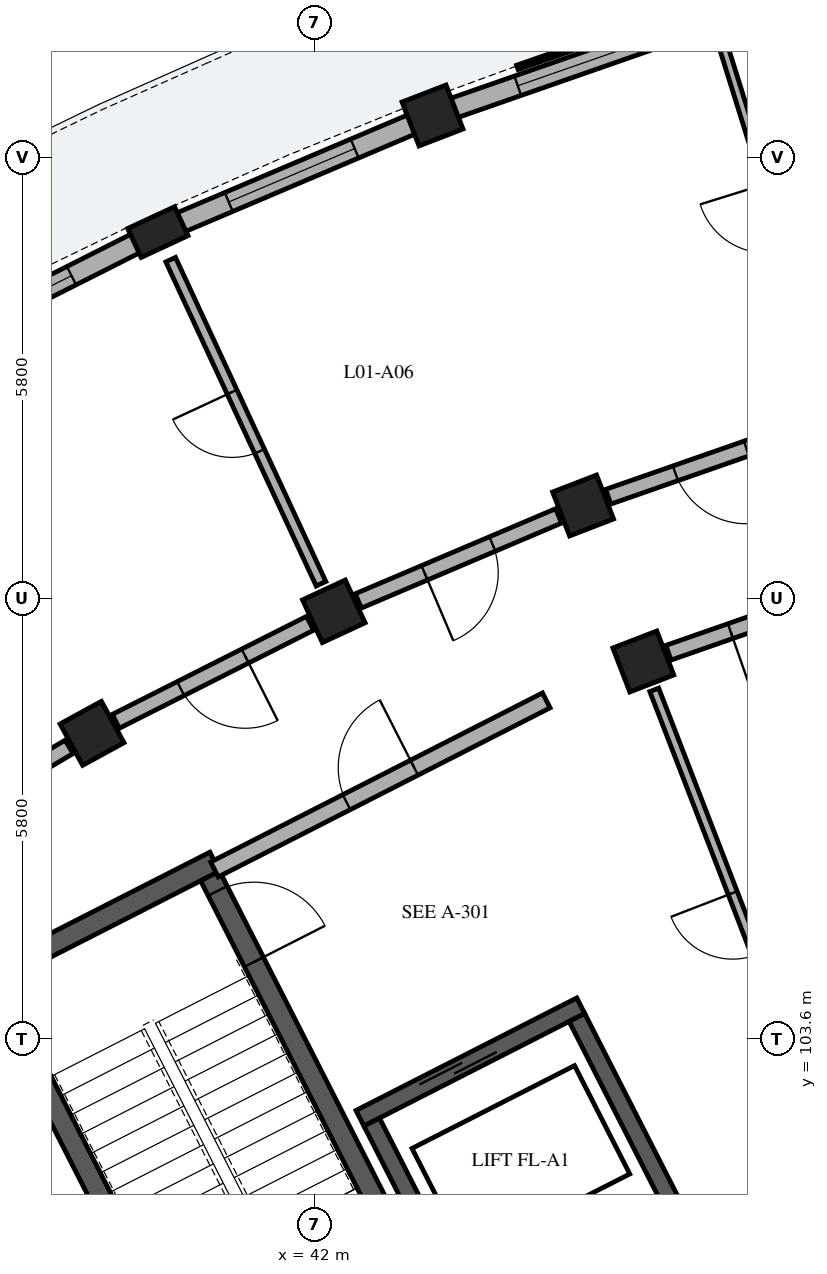
"""IFC4 building model, lengths in metres.
Left out: names, types, materials, properties, quantities, classifications, styles, units other than length and angle.
Written with IfcOpenShell. Run it as: python <this file> out.ifc"""

import sys

from ifc_helpers import new_model, si_unit, direction, frame, frame_2d, origin, origin_2d, place, context, subcontext, project, spatial, rectangle, extrude, element, fill, save


model = new_model("IFC4")
c1 = context("Model", 3, precision=1e-05, world=origin(), true_north=direction((0.0, 1.0)))
c2 = subcontext(c1, "Body", "Model", "MODEL_VIEW")
j1 = project(units=[si_unit("LENGTHUNIT", "METRE"), si_unit("PLANEANGLEUNIT", "RADIAN")], contexts=[c1])
p1 = place(None, origin())
s1 = spatial("IfcSite", under=j1, at=p1, CompositionType="ELEMENT")
p2 = place(p1, origin())
s2 = spatial("IfcBuilding", under=s1, at=p2, CompositionType="ELEMENT")
p3 = place(p2, frame((0.0, 0.0, 4.76)))
s3 = spatial("IfcBuildingStorey", under=s2, at=p3, CompositionType="ELEMENT", Elevation=4.76)
p4 = place(p3, frame((37.773, 104.296, 0.0), z_axis=(0.0, 0.0, 1.0), x_axis=(0.453992276384, -0.891005618941, 0.0)))
e1 = element("IfcWall", 1, at=p4, inside=s3, PredefinedType="SHEAR", context=c2, shape_type="SweptSolid", body=[
    extrude(rectangle(XDim=6.6, YDim=0.28, at=frame_2d((3.3, 0.0))), origin(), (0.0, 0.0, 1.0), 3.83),
])
p5 = place(p3, frame((37.585, 104.357, 0.0), z_axis=(0.0, 0.0, 1.0), x_axis=(0.891020222667, 0.453963613958, 0.0)))
e2 = element("IfcWall", 2, at=p5, inside=s3, PredefinedType="SHEAR", context=c2, shape_type="SweptSolid", body=[
    extrude(rectangle(XDim=3.48, YDim=0.28, at=frame_2d((1.74, 0.0))), origin(), (0.0, 0.0, 1.0), 3.83),
])
p6 = place(p3, frame((40.625, 105.748, 0.0), z_axis=(0.0, 0.0, 1.0), x_axis=(0.453992276384, -0.891005618941, 0.0)))
e3 = element("IfcWall", 3, at=p6, inside=s3, PredefinedType="SHEAR", context=c2, shape_type="SweptSolid", body=[
    extrude(rectangle(XDim=6.6, YDim=0.28, at=frame_2d((3.3, 0.0))), origin(), (0.0, 0.0, 1.0), 3.83),
])
p7 = place(p6, frame((0.22, 0.0, 0.0)))
e4 = element("IfcOpeningElement", 4, at=p7, cuts=e3, PredefinedType="OPENING", context=c2, shape_type="SweptSolid", body=[
    extrude(rectangle(XDim=1.05, YDim=2.15, at=frame_2d((0.525, 1.075))), frame((0.0, 0.15, 0.0), z_axis=(0.0, -1.0, 0.0), x_axis=(1.0, 0.0, 0.0)), (0.0, 0.0, 1.0), 0.3),
])
p8 = place(p3, frame((42.597, 102.561, 0.0), z_axis=(0.0, 0.0, 1.0), x_axis=(0.891001200497, 0.454000947921, 0.0)))
e5 = element("IfcWall", 5, at=p8, inside=s3, PredefinedType="SHEAR", context=c2, shape_type="SweptSolid", body=[
    extrude(rectangle(XDim=3.26, YDim=0.23, at=frame_2d((1.63, 0.0))), origin(), (0.0, 0.0, 1.0), 3.83),
])
p9 = place(p8, frame((0.9, 0.0, 0.0)))
e6 = element("IfcOpeningElement", 6, at=p9, cuts=e5, PredefinedType="OPENING", context=c2, shape_type="SweptSolid", body=[
    extrude(rectangle(XDim=1.1, YDim=2.15, at=frame_2d((0.55, 1.075))), frame((0.0, 0.125, 0.0), z_axis=(0.0, -1.0, 0.0), x_axis=(1.0, 0.0, 0.0)), (0.0, 0.0, 1.0), 0.25),
])
for number, where, z_axis, x_axis in (
    (7, (42.751, 102.511, 0.0), (0.0, 0.0, 1.0), (0.454, -0.891, 0.0)),
    (8, (45.451, 103.886, 0.0), (0.0, 0.0, 1.0), (0.454, -0.891, 0.0)),
):
    element("IfcWall", number, at=place(p3, frame(where, z_axis=z_axis, x_axis=x_axis)), inside=s3, PredefinedType="SHEAR", context=c2, shape_type="SweptSolid", body=[
        extrude(rectangle(XDim=2.7, YDim=0.23, at=frame_2d((1.35, 0.0))), origin(), (0.0, 0.0, 1.0), 3.83),
    ])
for number, where, z_axis, x_axis in (
    (9, (46.325, 108.57, 0.0), (0.0, 0.0, 1.0), (-0.36, 0.933, 0.0)),
    (10, (45.532, 110.622, 0.0), (0.0, 0.0, 1.0), (-0.36, 0.933, 0.0)),
    (11, (43.552, 115.753, 0.0), (0.0, 0.0, 1.0), (-0.36, 0.933, 0.0)),
    (12, (42.252, 109.23, 0.0), (0.0, 0.0, 1.0), (-0.421, 0.907, 0.0)),
):
    element("IfcColumn", number, at=place(p3, frame(where, z_axis=z_axis, x_axis=x_axis)), inside=s3, PredefinedType="COLUMN", context=c2, shape_type="SweptSolid", body=[
        extrude(rectangle(XDim=0.62, YDim=0.62, at=origin_2d()), origin(), (0.0, 0.0, 1.0), 3.825),
    ])
p10 = place(p3, frame((39.938, 114.219, 0.0), z_axis=(0.0, 0.0, 1.0), x_axis=(-0.420859924104, 0.907125638643, 0.0)))
e13 = element("IfcColumn", 13, at=p10, inside=s3, PredefinedType="PILASTER", context=c2, shape_type="SweptSolid", body=[
    extrude(rectangle(XDim=0.42, YDim=0.68, at=origin_2d()), origin(), (0.0, 0.0, 1.0), 3.825),
])
p11 = place(p3, frame((39.072, 107.625, 0.0), z_axis=(0.0, 0.0, 1.0), x_axis=(-0.479713133669, 0.877425386791, 0.0)))
e14 = element("IfcColumn", 14, at=p11, inside=s3, PredefinedType="COLUMN", context=c2, shape_type="SweptSolid", body=[
    extrude(rectangle(XDim=0.62, YDim=0.62, at=origin_2d()), origin(), (0.0, 0.0, 1.0), 3.825),
])
p12 = place(p3, frame((47.088, 116.986, 0.0), z_axis=(0.0, 0.0, 1.0), x_axis=(-0.944261813885, -0.329195423477, 0.0)))
e15 = element("IfcWall", 15, at=p12, inside=s3, PredefinedType="SOLIDWALL", context=c2, shape_type="SweptSolid", body=[
    extrude(rectangle(XDim=3.466, YDim=0.27, at=frame_2d((1.733, 0.0))), origin(), (0.0, 0.0, 1.0), 3.075),
])
p13 = place(p12, frame((0.908, 0.0, 0.55)))
e16 = element("IfcOpeningElement", 16, at=p13, cuts=e15, PredefinedType="OPENING", context=c2, shape_type="SweptSolid", body=[
    extrude(rectangle(XDim=1.65, YDim=1.8, at=frame_2d((0.825, 0.9))), frame((0.0, 0.145, 0.0), z_axis=(0.0, -1.0, 0.0), x_axis=(1.0, 0.0, 0.0)), (0.0, 0.0, 1.0), 0.29),
])
p14 = place(p3, frame((43.294, 115.644, 0.0), z_axis=(0.0, 0.0, 1.0), x_axis=(-0.920495033259, -0.390754262607, 0.0)))
e17 = element("IfcWall", 17, at=p14, inside=s3, PredefinedType="SOLIDWALL", context=c2, shape_type="SweptSolid", body=[
    extrude(rectangle(XDim=3.466, YDim=0.27, at=frame_2d((1.733, 0.0))), origin(), (0.0, 0.0, 1.0), 3.075),
])
p15 = place(p14, frame((0.833, 0.0, 0.55)))
e18 = element("IfcOpeningElement", 18, at=p15, cuts=e17, PredefinedType="OPENING", context=c2, shape_type="SweptSolid", body=[
    extrude(rectangle(XDim=1.8, YDim=1.85, at=frame_2d((0.9, 0.925))), frame((0.0, 0.145, 0.0), z_axis=(0.0, -1.0, 0.0), x_axis=(1.0, 0.0, 0.0)), (0.0, 0.0, 1.0), 0.29),
])
p16 = place(p3, frame((39.777, 114.138, 0.0), z_axis=(0.0, 0.0, 1.0), x_axis=(-0.892772658884, -0.450507468915, 0.0)))
e19 = element("IfcWall", 19, at=p16, inside=s3, PredefinedType="SOLIDWALL", context=c2, shape_type="SweptSolid", body=[
    extrude(rectangle(XDim=3.466, YDim=0.27, at=frame_2d((1.733, 0.0))), origin(), (0.0, 0.0, 1.0), 3.075),
])
p17 = place(p16, frame((1.093, 0.0, 0.55)))
e20 = element("IfcOpeningElement", 20, at=p17, cuts=e19, PredefinedType="OPENING", context=c2, shape_type="SweptSolid", body=[
    extrude(rectangle(XDim=1.28, YDim=1.52, at=frame_2d((0.64, 0.76))), frame((0.0, 0.145, 0.0), z_axis=(0.0, -1.0, 0.0), x_axis=(1.0, 0.0, 0.0)), (0.0, 0.0, 1.0), 0.29),
])
p18 = place(p3, frame((40.682, 105.834, 0.0), z_axis=(0.0, 0.0, 1.0), x_axis=(0.891003372311, 0.453996685595, 0.0)))
e21 = element("IfcWall", 21, at=p18, inside=s3, PredefinedType="PARTITIONING", context=c2, shape_type="SweptSolid", body=[
    extrude(rectangle(XDim=4.9, YDim=0.22, at=frame_2d((2.45, 0.0))), origin(), (0.0, 0.0, 1.0), 3.06),
])
p19 = place(p18, frame((1.95, 0.0, 0.0)))
e22 = element("IfcOpeningElement", 22, at=p19, cuts=e21, PredefinedType="OPENING", context=c2, shape_type="SweptSolid", body=[
    extrude(rectangle(XDim=1.0, YDim=2.15, at=frame_2d((0.5, 1.075))), frame((0.0, 0.12, 0.0), z_axis=(0.0, -1.0, 0.0), x_axis=(1.0, 0.0, 0.0)), (0.0, 0.0, 1.0), 0.24),
])
p20 = place(p3, frame((48.778, 112.177, 0.0), z_axis=(0.0, 0.0, 1.0), x_axis=(-0.297905254614, 0.954595442726, 0.0)))
e23 = element("IfcWall", 23, at=p20, inside=s3, PredefinedType="PARTITIONING", context=c2, shape_type="SweptSolid", body=[
    extrude(rectangle(XDim=4.7, YDim=0.115, at=frame_2d((2.35, 0.0))), origin(), (0.0, 0.0, 1.0), 3.09),
])
p21 = place(p20, frame((1.895, 0.0, 0.0)))
e24 = element("IfcOpeningElement", 24, at=p21, cuts=e23, PredefinedType="OPENING", context=c2, shape_type="SweptSolid", body=[
    extrude(rectangle(XDim=0.91, YDim=2.1, at=frame_2d((0.455, 1.05))), frame((0.0, 0.067, 0.0), z_axis=(0.0, -1.0, 0.0), x_axis=(1.0, 0.0, 0.0)), (0.0, 0.0, 1.0), 0.135),
])
p22 = place(p3, frame((48.566, 111.68, 0.0), z_axis=(0.0, 0.0, 1.0), x_axis=(-0.944253820929, -0.329218349522, 0.0)))
e25 = element("IfcWall", 25, at=p22, inside=s3, PredefinedType="PARTITIONING", context=c2, shape_type="SweptSolid", body=[
    extrude(rectangle(XDim=2.863, YDim=0.205, at=frame_2d((1.432, 0.0))), origin(), (0.0, 0.0, 1.0), 3.09),
])
p23 = place(p22, frame((0.937, 0.0, 0.0)))
e26 = element("IfcOpeningElement", 26, at=p23, cuts=e25, PredefinedType="OPENING", context=c2, shape_type="SweptSolid", body=[
    extrude(rectangle(XDim=0.99, YDim=2.16, at=frame_2d((0.495, 1.08))), frame((0.0, 0.113, 0.0), z_axis=(0.0, -1.0, 0.0), x_axis=(1.0, 0.0, 0.0)), (0.0, 0.0, 1.0), 0.225),
])
p24 = place(p3, frame((49.222, 109.58, 0.0), z_axis=(0.0, 0.0, 1.0), x_axis=(-0.944265123647, -0.329185929627, 0.0)))
e27 = element("IfcWall", 27, at=p24, inside=s3, PredefinedType="PARTITIONING", context=c2, shape_type="SweptSolid", body=[
    extrude(rectangle(XDim=2.718, YDim=0.205, at=frame_2d((1.359, 0.0))), origin(), (0.0, 0.0, 1.0), 3.09),
])
p25 = place(p24, frame((0.864, 0.0, 0.0)))
e28 = element("IfcOpeningElement", 28, at=p25, cuts=e27, PredefinedType="OPENING", context=c2, shape_type="SweptSolid", body=[
    extrude(rectangle(XDim=0.99, YDim=2.16, at=frame_2d((0.495, 1.08))), frame((0.0, 0.113, 0.0), z_axis=(0.0, -1.0, 0.0), x_axis=(1.0, 0.0, 0.0)), (0.0, 0.0, 1.0), 0.225),
])
p26 = place(p3, frame((48.846, 102.04, 0.0), z_axis=(0.0, 0.0, 1.0), x_axis=(-0.360183473608, 0.932881485152, 0.0)))
e29 = element("IfcWall", 29, at=p26, inside=s3, PredefinedType="PARTITIONING", context=c2, shape_type="SweptSolid", body=[
    extrude(rectangle(XDim=6.6, YDim=0.125, at=frame_2d((3.3, 0.0))), origin(), (0.0, 0.0, 1.0), 3.09),
])
p27 = place(p26, frame((2.865, 0.0, 0.0)))
e30 = element("IfcOpeningElement", 30, at=p27, cuts=e29, PredefinedType="OPENING", context=c2, shape_type="SweptSolid", body=[
    extrude(rectangle(XDim=0.87, YDim=2.08, at=frame_2d((0.435, 1.04))), frame((0.0, 0.073, 0.0), z_axis=(0.0, -1.0, 0.0), x_axis=(1.0, 0.0, 0.0)), (0.0, 0.0, 1.0), 0.145),
])
p28 = place(p3, frame((45.21, 110.486, 0.0), z_axis=(0.0, 0.0, 1.0), x_axis=(-0.920511160294, -0.390716270168, 0.0)))
e31 = element("IfcWall", 31, at=p28, inside=s3, PredefinedType="PARTITIONING", context=c2, shape_type="SweptSolid", body=[
    extrude(rectangle(XDim=2.863, YDim=0.205, at=frame_2d((1.432, 0.0))), origin(), (0.0, 0.0, 1.0), 3.09),
])
p29 = place(p28, frame((0.947, 0.0, 0.0)))
e32 = element("IfcOpeningElement", 32, at=p29, cuts=e31, PredefinedType="OPENING", context=c2, shape_type="SweptSolid", body=[
    extrude(rectangle(XDim=0.97, YDim=2.15, at=frame_2d((0.485, 1.075))), frame((0.0, 0.113, 0.0), z_axis=(0.0, -1.0, 0.0), x_axis=(1.0, 0.0, 0.0)), (0.0, 0.0, 1.0), 0.225),
])
p30 = place(p3, frame((42.084, 109.593, 0.0), z_axis=(0.0, 0.0, 1.0), x_axis=(-0.420862519045, 0.907124434718, 0.0)))
e33 = element("IfcWall", 33, at=p30, inside=s3, PredefinedType="PLUMBINGWALL", context=c2, shape_type="SweptSolid", body=[
    extrude(rectangle(XDim=4.7, YDim=0.14, at=frame_2d((2.35, 0.0))), origin(), (0.0, 0.0, 1.0), 3.09),
])
p31 = place(p30, frame((1.92, 0.0, 0.0)))
e34 = element("IfcOpeningElement", 34, at=p31, cuts=e33, PredefinedType="OPENING", context=c2, shape_type="SweptSolid", body=[
    extrude(rectangle(XDim=0.86, YDim=2.06, at=frame_2d((0.43, 1.03))), frame((0.0, 0.08, 0.0), z_axis=(0.0, -1.0, 0.0), x_axis=(1.0, 0.0, 0.0)), (0.0, 0.0, 1.0), 0.16),
])
p32 = place(p3, frame((41.94, 109.073, 0.0), z_axis=(0.0, 0.0, 1.0), x_axis=(-0.89273239336, -0.450587254419, 0.0)))
e35 = element("IfcWall", 35, at=p32, inside=s3, PredefinedType="PARTITIONING", context=c2, shape_type="SweptSolid", body=[
    extrude(rectangle(XDim=2.863, YDim=0.205, at=frame_2d((1.432, 0.0))), origin(), (0.0, 0.0, 1.0), 3.09),
])
p33 = place(p32, frame((0.957, 0.0, 0.0)))
e36 = element("IfcOpeningElement", 36, at=p33, cuts=e35, PredefinedType="OPENING", context=c2, shape_type="SweptSolid", body=[
    extrude(rectangle(XDim=0.95, YDim=2.13, at=frame_2d((0.475, 1.065))), frame((0.0, 0.113, 0.0), z_axis=(0.0, -1.0, 0.0), x_axis=(1.0, 0.0, 0.0)), (0.0, 0.0, 1.0), 0.225),
])
p34 = place(p3, frame((38.77, 107.447, 0.0), z_axis=(0.0, 0.0, 1.0), x_axis=(-0.861113214678, -0.508413248753, 0.0)))
e37 = element("IfcWall", 37, at=p34, inside=s3, PredefinedType="PARTITIONING", context=c2, shape_type="SweptSolid", body=[
    extrude(rectangle(XDim=2.863, YDim=0.205, at=frame_2d((1.432, 0.0))), origin(), (0.0, 0.0, 1.0), 3.09),
])
p35 = place(p34, frame((0.967, 0.0, 0.0)))
e38 = element("IfcOpeningElement", 38, at=p35, cuts=e37, PredefinedType="OPENING", context=c2, shape_type="SweptSolid", body=[
    extrude(rectangle(XDim=0.93, YDim=2.12, at=frame_2d((0.465, 1.06))), frame((0.0, 0.113, 0.0), z_axis=(0.0, -1.0, 0.0), x_axis=(1.0, 0.0, 0.0)), (0.0, 0.0, 1.0), 0.225),
])
p36 = place(p13, origin())
e39 = element("IfcWindow", 39, at=p36, inside=s3, PartitioningType="SINGLE_PANEL", PredefinedType="WINDOW", context=c2, shape_type="SweptSolid", body=[
    extrude(rectangle(XDim=1.65, YDim=1.8, at=frame_2d((0.825, 0.9))), frame((0.0, 0.03, 0.0), z_axis=(0.0, -1.0, 0.0), x_axis=(1.0, 0.0, 0.0)), (0.0, 0.0, 1.0), 0.06),
])
fill(e16, e39)
p37 = place(p15, origin())
e40 = element("IfcWindow", 40, at=p37, inside=s3, PartitioningType="SINGLE_PANEL", PredefinedType="WINDOW", context=c2, shape_type="SweptSolid", body=[
    extrude(rectangle(XDim=1.8, YDim=1.85, at=frame_2d((0.9, 0.925))), frame((0.0, 0.03, 0.0), z_axis=(0.0, -1.0, 0.0), x_axis=(1.0, 0.0, 0.0)), (0.0, 0.0, 1.0), 0.06),
])
fill(e18, e40)
p38 = place(p17, origin())
e41 = element("IfcWindow", 41, at=p38, inside=s3, PartitioningType="SINGLE_PANEL", PredefinedType="WINDOW", context=c2, shape_type="SweptSolid", body=[
    extrude(rectangle(XDim=1.28, YDim=1.52, at=frame_2d((0.64, 0.76))), frame((0.0, 0.03, 0.0), z_axis=(0.0, -1.0, 0.0), x_axis=(1.0, 0.0, 0.0)), (0.0, 0.0, 1.0), 0.06),
])
fill(e20, e41)
p39 = place(p7, origin())
e42 = element("IfcDoor", 42, at=p39, inside=s3, OperationType="SINGLE_SWING_RIGHT", PredefinedType="DOOR", context=c2, shape_type="SweptSolid", body=[
    extrude(rectangle(XDim=1.05, YDim=2.15, at=frame_2d((0.525, 1.075))), frame((0.0, 0.025, 0.0), z_axis=(0.0, -1.0, 0.0), x_axis=(1.0, 0.0, 0.0)), (0.0, 0.0, 1.0), 0.05),
])
fill(e4, e42)
p40 = place(p9, origin())
e43 = element("IfcDoor", 43, at=p40, inside=s3, OperationType="DOUBLE_DOOR_SLIDING", PredefinedType="DOOR", context=c2, shape_type="SweptSolid", body=[
    extrude(rectangle(XDim=1.1, YDim=2.15, at=frame_2d((0.55, 1.075))), frame((0.0, 0.025, 0.0), z_axis=(0.0, -1.0, 0.0), x_axis=(1.0, 0.0, 0.0)), (0.0, 0.0, 1.0), 0.05),
])
fill(e6, e43)
p41 = place(p19, origin())
e44 = element("IfcDoor", 44, at=p41, inside=s3, OperationType="SINGLE_SWING_RIGHT", PredefinedType="DOOR", context=c2, shape_type="SweptSolid", body=[
    extrude(rectangle(XDim=1.0, YDim=2.15, at=frame_2d((0.5, 1.075))), frame((0.0, 0.025, 0.0), z_axis=(0.0, -1.0, 0.0), x_axis=(1.0, 0.0, 0.0)), (0.0, 0.0, 1.0), 0.05),
])
fill(e22, e44)
p42 = place(p23, origin())
e45 = element("IfcDoor", 45, at=p42, inside=s3, OperationType="SINGLE_SWING_LEFT", PredefinedType="DOOR", context=c2, shape_type="SweptSolid", body=[
    extrude(rectangle(XDim=0.99, YDim=2.16, at=frame_2d((0.495, 1.08))), frame((0.0, 0.025, 0.0), z_axis=(0.0, -1.0, 0.0), x_axis=(1.0, 0.0, 0.0)), (0.0, 0.0, 1.0), 0.05),
])
fill(e26, e45)
p43 = place(p25, origin())
e46 = element("IfcDoor", 46, at=p43, inside=s3, OperationType="SINGLE_SWING_RIGHT", PredefinedType="DOOR", context=c2, shape_type="SweptSolid", body=[
    extrude(rectangle(XDim=0.99, YDim=2.16, at=frame_2d((0.495, 1.08))), frame((0.0, 0.025, 0.0), z_axis=(0.0, -1.0, 0.0), x_axis=(1.0, 0.0, 0.0)), (0.0, 0.0, 1.0), 0.05),
])
fill(e28, e46)
p44 = place(p27, origin())
e47 = element("IfcDoor", 47, at=p44, inside=s3, OperationType="SINGLE_SWING_RIGHT", PredefinedType="DOOR", context=c2, shape_type="SweptSolid", body=[
    extrude(rectangle(XDim=0.87, YDim=2.08, at=frame_2d((0.435, 1.04))), frame((0.0, 0.025, 0.0), z_axis=(0.0, -1.0, 0.0), x_axis=(1.0, 0.0, 0.0)), (0.0, 0.0, 1.0), 0.05),
])
fill(e30, e47)
p45 = place(p29, origin())
e48 = element("IfcDoor", 48, at=p45, inside=s3, OperationType="SINGLE_SWING_RIGHT", PredefinedType="DOOR", context=c2, shape_type="SweptSolid", body=[
    extrude(rectangle(XDim=0.97, YDim=2.15, at=frame_2d((0.485, 1.075))), frame((0.0, 0.025, 0.0), z_axis=(0.0, -1.0, 0.0), x_axis=(1.0, 0.0, 0.0)), (0.0, 0.0, 1.0), 0.05),
])
fill(e32, e48)
p46 = place(p31, origin())
e49 = element("IfcDoor", 49, at=p46, inside=s3, OperationType="SINGLE_SWING_RIGHT", PredefinedType="DOOR", context=c2, shape_type="SweptSolid", body=[
    extrude(rectangle(XDim=0.86, YDim=2.06, at=frame_2d((0.43, 1.03))), frame((0.0, 0.025, 0.0), z_axis=(0.0, -1.0, 0.0), x_axis=(1.0, 0.0, 0.0)), (0.0, 0.0, 1.0), 0.05),
])
fill(e34, e49)
p47 = place(p33, origin())
e50 = element("IfcDoor", 50, at=p47, inside=s3, OperationType="SINGLE_SWING_LEFT", PredefinedType="DOOR", context=c2, shape_type="SweptSolid", body=[
    extrude(rectangle(XDim=0.95, YDim=2.13, at=frame_2d((0.475, 1.065))), frame((0.0, 0.025, 0.0), z_axis=(0.0, -1.0, 0.0), x_axis=(1.0, 0.0, 0.0)), (0.0, 0.0, 1.0), 0.05),
])
fill(e36, e50)
save(model, sys.argv[1])
